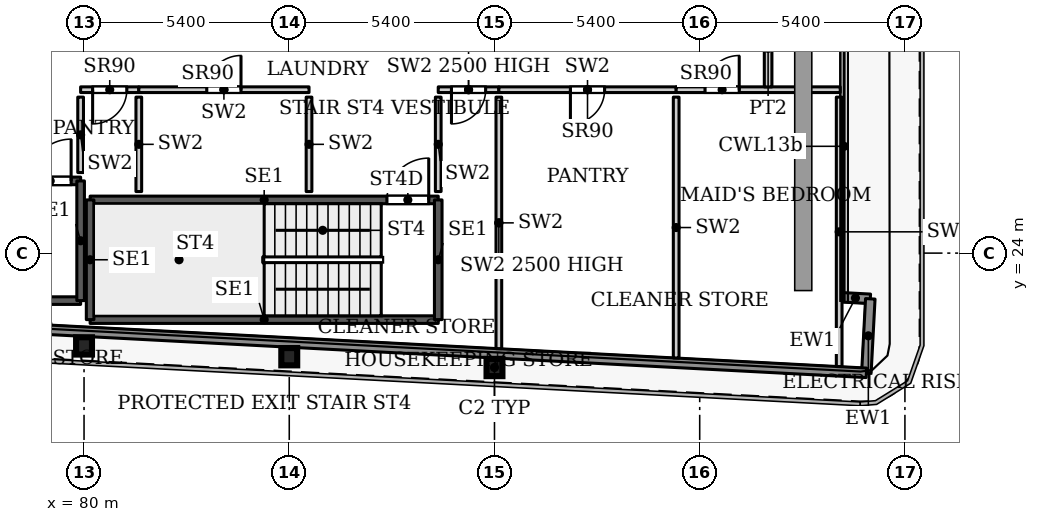
"""IFC4 building model, lengths in metres.
Left out: names, types, materials, properties, quantities, classifications, styles, units other than length and angle.
Written with IfcOpenShell. Run it as: python <this file> out.ifc"""

import sys

from ifc_helpers import new_model, si_unit, direction, frame, frame_2d, origin, origin_2d, place, context, subcontext, project, spatial, rectangle, i_section, extrude, source, transform, mapped, element, fill, save


model = new_model("IFC4")
c1 = context("Model", 3, precision=1e-05, world=origin(), true_north=direction((0.0, 1.0)))
c2 = subcontext(c1, "Body", "Model", "MODEL_VIEW")
j1 = project(units=[si_unit("LENGTHUNIT", "METRE"), si_unit("PLANEANGLEUNIT", "RADIAN")], contexts=[c1])
p1 = place(None, origin())
s1 = spatial("IfcSite", under=j1, at=p1, CompositionType="ELEMENT")
p2 = place(p1, origin())
s2 = spatial("IfcBuilding", under=s1, at=p2, CompositionType="ELEMENT")
p3 = place(p2, frame((0.0, 0.0, 137.0)))
s3 = spatial("IfcBuildingStorey", under=s2, at=p3, CompositionType="ELEMENT", Elevation=137.0)
for number, where, z_axis, x_axis in (
    (1, (90.8, 20.99, 0.0), (0.0, 0.0, 1.0), (1.0, 0.0, 0.0)),
    (2, (85.4, 21.274, 0.0), (0.0, 0.0, 1.0), (1.0, 0.0, 0.0)),
    (3, (80.0, 21.558, 0.0), (0.0, 0.0, 1.0), (1.0, 0.0, 0.0)),
):
    element("IfcColumn", number, at=place(p3, frame(where, z_axis=z_axis, x_axis=x_axis)), inside=s3, PredefinedType="COLUMN", context=c2, shape_type="SweptSolid", body=[
        extrude(i_section(OverallWidth=0.418, OverallDepth=0.455, WebThickness=0.042, FlangeThickness=0.068, FilletRadius=0.014, at=origin_2d()), origin(), (0.0, 0.0, 1.0), 3.9),
    ])
p4 = place(p3, frame((99.907, 22.839, 0.0), z_axis=(0.0, 0.0, 1.0), x_axis=(0.998561284263, -0.053622398031, 0.0)))
e4 = element("IfcWall", 4, at=p4, inside=s3, PredefinedType="SOLIDWALL", context=c2, shape_type="SweptSolid", body=[
    extrude(rectangle(XDim=0.783, YDim=0.25, at=frame_2d((0.392, 0.0))), origin(), (0.0, 0.0, 1.0), 3.75),
])
p5 = place(p3, frame((100.689, 22.797, 0.0), z_axis=(0.0, 0.0, 1.0), x_axis=(-0.052841433274, -0.998602915542, 0.0)))
e5 = element("IfcWall", 5, at=p5, inside=s3, PredefinedType="SOLIDWALL", context=c2, shape_type="SweptSolid", body=[
    extrude(rectangle(XDim=1.95, YDim=0.25, at=frame_2d((0.975, 0.0))), origin(), (0.0, 0.0, 1.0), 3.75),
])
p6 = place(p3, frame((100.586, 20.85, 0.0), z_axis=(0.0, 0.0, 1.0), x_axis=(-0.99861746497, 0.052565755559, 0.0)))
e6 = element("IfcWall", 6, at=p6, inside=s3, PredefinedType="SOLIDWALL", context=c2, shape_type="SweptSolid", body=[
    extrude(rectangle(XDim=66.639, YDim=0.25, at=frame_2d((33.319, 0.0))), origin(), (0.0, 0.0, 1.0), 3.75),
])
p7 = place(p3, frame((80.16, 22.25, 0.0), z_axis=(0.0, 0.0, 1.0), x_axis=(1.0, 0.0, 0.0)))
e7 = element("IfcWall", 7, at=p7, inside=s3, PredefinedType="SHEAR", context=c2, shape_type="SweptSolid", body=[
    extrude(rectangle(XDim=9.16, YDim=0.2, at=frame_2d((4.58, 0.0))), origin(), (0.0, 0.0, 1.0), 3.9),
])
p8 = place(p3, frame((80.16, 25.4, 0.0), z_axis=(0.0, 0.0, 1.0), x_axis=(1.0, 0.0, 0.0)))
e8 = element("IfcWall", 8, at=p8, inside=s3, PredefinedType="SHEAR", context=c2, shape_type="SweptSolid", body=[
    extrude(rectangle(XDim=9.16, YDim=0.2, at=frame_2d((4.58, 0.0))), origin(), (0.0, 0.0, 1.0), 3.9),
])
p9 = place(p8, frame((7.81, 0.0, 0.0)))
e9 = element("IfcOpeningElement", 9, at=p9, cuts=e8, PredefinedType="OPENING", context=c2, shape_type="SweptSolid", body=[
    extrude(rectangle(XDim=1.1, YDim=2.2, at=frame_2d((0.55, 1.1))), frame((0.0, 0.11, 0.0), z_axis=(0.0, -1.0, 0.0), x_axis=(1.0, 0.0, 0.0)), (0.0, 0.0, 1.0), 0.22),
])
for number, where, z_axis, x_axis in (
    (10, (80.16, 22.25, 0.0), (0.0, 0.0, 1.0), (0.0, 1.0, 0.0)),
    (11, (89.32, 22.25, 0.0), (0.0, 0.0, 1.0), (0.0, 1.0, 0.0)),
):
    element("IfcWall", number, at=place(p3, frame(where, z_axis=z_axis, x_axis=x_axis)), inside=s3, PredefinedType="SHEAR", context=c2, shape_type="SweptSolid", body=[
        extrude(rectangle(XDim=3.15, YDim=0.2, at=frame_2d((1.575, 0.0))), origin(), (0.0, 0.0, 1.0), 3.9),
    ])
p10 = place(p3, frame((70.75, 22.75, 0.0), z_axis=(0.0, 0.0, 1.0), x_axis=(1.0, 0.0, 0.0)))
e12 = element("IfcWall", 12, at=p10, inside=s3, PredefinedType="SHEAR", context=c2, shape_type="SweptSolid", body=[
    extrude(rectangle(XDim=9.16, YDim=0.2, at=frame_2d((4.58, 0.0))), origin(), (0.0, 0.0, 1.0), 3.9),
])
p11 = place(p3, frame((70.75, 25.9, 0.0), z_axis=(0.0, 0.0, 1.0), x_axis=(1.0, 0.0, 0.0)))
e13 = element("IfcWall", 13, at=p11, inside=s3, PredefinedType="SHEAR", context=c2, shape_type="SweptSolid", body=[
    extrude(rectangle(XDim=9.16, YDim=0.2, at=frame_2d((4.58, 0.0))), origin(), (0.0, 0.0, 1.0), 3.9),
])
p12 = place(p11, frame((7.81, 0.0, 0.0)))
e14 = element("IfcOpeningElement", 14, at=p12, cuts=e13, PredefinedType="OPENING", context=c2, shape_type="SweptSolid", body=[
    extrude(rectangle(XDim=1.1, YDim=2.2, at=frame_2d((0.55, 1.1))), frame((0.0, 0.11, 0.0), z_axis=(0.0, -1.0, 0.0), x_axis=(1.0, 0.0, 0.0)), (0.0, 0.0, 1.0), 0.22),
])
p13 = place(p3, frame((79.91, 22.75, 0.0), z_axis=(0.0, 0.0, 1.0), x_axis=(0.0, 1.0, 0.0)))
e15 = element("IfcWall", 15, at=p13, inside=s3, PredefinedType="SHEAR", context=c2, shape_type="SweptSolid", body=[
    extrude(rectangle(XDim=3.15, YDim=0.2, at=frame_2d((1.575, 0.0))), origin(), (0.0, 0.0, 1.0), 3.9),
])
p14 = place(p3, frame((79.91, 28.3, 0.0), z_axis=(0.0, 0.0, 1.0), x_axis=(1.0, 0.0, 0.0)))
e16 = element("IfcWall", 16, at=p14, inside=s3, PredefinedType="PARTITIONING", context=c2, shape_type="SweptSolid", body=[
    extrude(rectangle(XDim=1.531, YDim=0.15, at=frame_2d((0.766, 0.0))), origin(), (0.0, 0.0, 1.0), 3.9),
])
p15 = place(p14, frame((0.316, 0.0, 0.0)))
e17 = element("IfcOpeningElement", 17, at=p15, cuts=e16, PredefinedType="OPENING", context=c2, shape_type="SweptSolid", body=[
    extrude(rectangle(XDim=0.9, YDim=2.2, at=frame_2d((0.45, 1.1))), frame((0.0, 0.085, 0.0), z_axis=(0.0, -1.0, 0.0), x_axis=(1.0, 0.0, 0.0)), (0.0, 0.0, 1.0), 0.17),
])
p16 = place(p3, frame((79.91, 26.12, 0.0), z_axis=(0.0, 0.0, 1.0), x_axis=(0.0, 1.0, 0.0)))
e18 = element("IfcWall", 18, at=p16, inside=s3, PredefinedType="PARTITIONING", context=c2, shape_type="SweptSolid", body=[
    extrude(rectangle(XDim=1.985, YDim=0.15, at=frame_2d((0.992, 0.0))), origin(), (0.0, 0.0, 1.0), 3.9),
])
p17 = place(p3, frame((81.441, 25.62, 0.0), z_axis=(0.0, 0.0, 1.0), x_axis=(0.0, 1.0, 0.0)))
e19 = element("IfcWall", 19, at=p17, inside=s3, PredefinedType="PARTITIONING", context=c2, shape_type="SweptSolid", body=[
    extrude(rectangle(XDim=2.485, YDim=0.15, at=frame_2d((1.242, 0.0))), origin(), (0.0, 0.0, 1.0), 3.9),
])
p18 = place(p3, frame((81.441, 28.3, 0.0), z_axis=(0.0, 0.0, 1.0), x_axis=(1.0, 0.0, 0.0)))
e20 = element("IfcWall", 20, at=p18, inside=s3, PredefinedType="PARTITIONING", context=c2, shape_type="SweptSolid", body=[
    extrude(rectangle(XDim=4.479, YDim=0.15, at=frame_2d((2.24, 0.0))), origin(), (0.0, 0.0, 1.0), 3.9),
])
p19 = place(p18, frame((1.789, 0.0, 0.0)))
e21 = element("IfcOpeningElement", 21, at=p19, cuts=e20, PredefinedType="OPENING", context=c2, shape_type="SweptSolid", body=[
    extrude(rectangle(XDim=0.9, YDim=2.2, at=frame_2d((0.45, 1.1))), frame((0.0, 0.085, 0.0), z_axis=(0.0, -1.0, 0.0), x_axis=(1.0, 0.0, 0.0)), (0.0, 0.0, 1.0), 0.17),
])
p20 = place(p3, frame((85.92, 25.62, 0.0), z_axis=(0.0, 0.0, 1.0), x_axis=(0.0, 1.0, 0.0)))
e22 = element("IfcWall", 22, at=p20, inside=s3, PredefinedType="PARTITIONING", context=c2, shape_type="SweptSolid", body=[
    extrude(rectangle(XDim=2.485, YDim=0.15, at=frame_2d((1.242, 0.0))), origin(), (0.0, 0.0, 1.0), 3.9),
])
p21 = place(p3, frame((89.32, 28.3, 0.0), z_axis=(0.0, 0.0, 1.0), x_axis=(1.0, 0.0, 0.0)))
e23 = element("IfcWall", 23, at=p21, inside=s3, PredefinedType="PARTITIONING", context=c2, shape_type="SweptSolid", body=[
    extrude(rectangle(XDim=1.595, YDim=0.15, at=frame_2d((0.797, 0.0))), origin(), (0.0, 0.0, 1.0), 2.5),
])
p22 = place(p21, frame((0.348, 0.0, 0.0)))
e24 = element("IfcOpeningElement", 24, at=p22, cuts=e23, PredefinedType="OPENING", context=c2, shape_type="SweptSolid", body=[
    extrude(rectangle(XDim=0.9, YDim=2.2, at=frame_2d((0.45, 1.1))), frame((0.0, 0.085, 0.0), z_axis=(0.0, -1.0, 0.0), x_axis=(1.0, 0.0, 0.0)), (0.0, 0.0, 1.0), 0.17),
])
p23 = place(p3, frame((89.32, 25.62, 0.0), z_axis=(0.0, 0.0, 1.0), x_axis=(0.0, 1.0, 0.0)))
e25 = element("IfcWall", 25, at=p23, inside=s3, PredefinedType="PARTITIONING", context=c2, shape_type="SweptSolid", body=[
    extrude(rectangle(XDim=2.485, YDim=0.15, at=frame_2d((1.242, 0.0))), origin(), (0.0, 0.0, 1.0), 3.9),
])
p24 = place(p3, frame((90.915, 21.487, 0.0), z_axis=(0.0, 0.0, 1.0), x_axis=(0.0, 1.0, 0.0)))
e26 = element("IfcWall", 26, at=p24, inside=s3, PredefinedType="PARTITIONING", context=c2, shape_type="SweptSolid", body=[
    extrude(rectangle(XDim=6.618, YDim=0.15, at=frame_2d((3.309, 0.0))), origin(), (0.0, 0.0, 1.0), 2.5),
])
p25 = place(p3, frame((90.915, 28.3, 0.0), z_axis=(0.0, 0.0, 1.0), x_axis=(1.0, 0.0, 0.0)))
e27 = element("IfcWall", 27, at=p25, inside=s3, PredefinedType="PARTITIONING", context=c2, shape_type="SweptSolid", body=[
    extrude(rectangle(XDim=4.666, YDim=0.15, at=frame_2d((2.333, 0.0))), origin(), (0.0, 0.0, 1.0), 3.9),
])
p26 = place(p25, frame((1.883, 0.0, 0.0)))
e28 = element("IfcOpeningElement", 28, at=p26, cuts=e27, PredefinedType="OPENING", context=c2, shape_type="SweptSolid", body=[
    extrude(rectangle(XDim=0.9, YDim=2.2, at=frame_2d((0.45, 1.1))), frame((0.0, 0.085, 0.0), z_axis=(0.0, -1.0, 0.0), x_axis=(1.0, 0.0, 0.0)), (0.0, 0.0, 1.0), 0.17),
])
p27 = place(p3, frame((95.581, 21.241, 0.0), z_axis=(0.0, 0.0, 1.0), x_axis=(0.0, 1.0, 0.0)))
e29 = element("IfcWall", 29, at=p27, inside=s3, PredefinedType="PARTITIONING", context=c2, shape_type="SweptSolid", body=[
    extrude(rectangle(XDim=6.864, YDim=0.15, at=frame_2d((3.432, 0.0))), origin(), (0.0, 0.0, 1.0), 3.9),
])
p28 = place(p3, frame((95.581, 28.3, 0.0), z_axis=(0.0, 0.0, 1.0), x_axis=(1.0, 0.0, 0.0)))
e30 = element("IfcWall", 30, at=p28, inside=s3, PredefinedType="PARTITIONING", context=c2, shape_type="SweptSolid", body=[
    extrude(rectangle(XDim=4.317, YDim=0.15, at=frame_2d((2.158, 0.0))), origin(), (0.0, 0.0, 1.0), 3.9),
])
p29 = place(p28, frame((0.759, 0.0, 0.0)))
e31 = element("IfcOpeningElement", 31, at=p29, cuts=e30, PredefinedType="OPENING", context=c2, shape_type="SweptSolid", body=[
    extrude(rectangle(XDim=0.9, YDim=2.2, at=frame_2d((0.45, 1.1))), frame((0.0, 0.085, 0.0), z_axis=(0.0, -1.0, 0.0), x_axis=(1.0, 0.0, 0.0)), (0.0, 0.0, 1.0), 0.17),
])
p30 = place(p3, frame((99.87, 21.015, 0.0), z_axis=(0.0, 0.0, 1.0), x_axis=(0.0, 1.0, 0.0)))
e32 = element("IfcWall", 32, at=p30, inside=s3, PredefinedType="PARTITIONING", context=c2, shape_type="SweptSolid", body=[
    extrude(rectangle(XDim=7.09, YDim=0.15, at=frame_2d((3.545, 0.0))), origin(), (0.0, 0.0, 1.0), 3.9),
])
p31 = place(p3, frame((98.0, 28.374, 0.0), z_axis=(0.0, 0.0, 1.0), x_axis=(0.0, 1.0, 0.0)))
e33 = element("IfcWall", 33, at=p31, inside=s3, PredefinedType="PARTITIONING", context=c2, shape_type="SweptSolid", body=[
    extrude(rectangle(XDim=2.026, YDim=0.2, at=frame_2d((1.013, 0.0))), origin(), (0.0, 0.0, 1.0), 3.6),
])
m1 = source(origin(), c2, "Body", "SweptSolid", [
    extrude(rectangle(XDim=0.9, YDim=2.2, at=frame_2d((0.45, 1.1))), frame((0.0, 0.025, 0.0), z_axis=(0.0, -1.0, 0.0), x_axis=(1.0, 0.0, 0.0)), (0.0, 0.0, 1.0), 0.05),
])
p32 = place(p15, origin())
e34 = element("IfcDoor", 34, at=p32, inside=s3, OperationType="SINGLE_SWING_RIGHT", PredefinedType="DOOR", context=c2, shape_type="MappedRepresentation", body=[
    mapped(m1, transform((0.0, 0.0, 0.0), x_axis=(1.0, 0.0, 0.0), y_axis=(0.0, 1.0, 0.0), z_axis=(0.0, 0.0, 1.0), scale=1.0)),
])
fill(e17, e34)
p33 = place(p19, origin())
e35 = element("IfcDoor", 35, at=p33, inside=s3, OperationType="SINGLE_SWING_LEFT", PredefinedType="DOOR", context=c2, shape_type="MappedRepresentation", body=[
    mapped(m1, transform((0.0, 0.0, 0.0), x_axis=(1.0, 0.0, 0.0), y_axis=(0.0, 1.0, 0.0), z_axis=(0.0, 0.0, 1.0), scale=1.0)),
])
fill(e21, e35)
p34 = place(p22, origin())
e36 = element("IfcDoor", 36, at=p34, inside=s3, OperationType="SINGLE_SWING_RIGHT", PredefinedType="DOOR", context=c2, shape_type="MappedRepresentation", body=[
    mapped(m1, transform((0.0, 0.0, 0.0), x_axis=(1.0, 0.0, 0.0), y_axis=(0.0, 1.0, 0.0), z_axis=(0.0, 0.0, 1.0), scale=1.0)),
])
fill(e24, e36)
p35 = place(p26, origin())
e37 = element("IfcDoor", 37, at=p35, inside=s3, OperationType="SINGLE_SWING_RIGHT", PredefinedType="DOOR", context=c2, shape_type="MappedRepresentation", body=[
    mapped(m1, transform((0.0, 0.0, 0.0), x_axis=(1.0, 0.0, 0.0), y_axis=(0.0, 1.0, 0.0), z_axis=(0.0, 0.0, 1.0), scale=1.0)),
])
fill(e28, e37)
p36 = place(p29, origin())
e38 = element("IfcDoor", 38, at=p36, inside=s3, OperationType="SINGLE_SWING_LEFT", PredefinedType="DOOR", context=c2, shape_type="MappedRepresentation", body=[
    mapped(m1, transform((0.0, 0.0, 0.0), x_axis=(1.0, 0.0, 0.0), y_axis=(0.0, 1.0, 0.0), z_axis=(0.0, 0.0, 1.0), scale=1.0)),
])
fill(e31, e38)
m2 = source(origin(), c2, "Body", "SweptSolid", [
    extrude(rectangle(XDim=1.1, YDim=2.2, at=frame_2d((0.55, 1.1))), frame((0.0, 0.025, 0.0), z_axis=(0.0, -1.0, 0.0), x_axis=(1.0, 0.0, 0.0)), (0.0, 0.0, 1.0), 0.05),
])
p37 = place(p9, origin())
e39 = element("IfcDoor", 39, at=p37, inside=s3, OperationType="SINGLE_SWING_LEFT", PredefinedType="DOOR", context=c2, shape_type="MappedRepresentation", body=[
    mapped(m2, transform((0.0, 0.0, 0.0), x_axis=(1.0, 0.0, 0.0), y_axis=(0.0, 1.0, 0.0), z_axis=(0.0, 0.0, 1.0), scale=1.0)),
])
fill(e9, e39)
p38 = place(p12, origin())
e40 = element("IfcDoor", 40, at=p38, inside=s3, OperationType="SINGLE_SWING_LEFT", PredefinedType="DOOR", context=c2, shape_type="MappedRepresentation", body=[
    mapped(m2, transform((0.0, 0.0, 0.0), x_axis=(1.0, 0.0, 0.0), y_axis=(0.0, 1.0, 0.0), z_axis=(0.0, 0.0, 1.0), scale=1.0)),
])
fill(e14, e40)
save(model, sys.argv[1])
